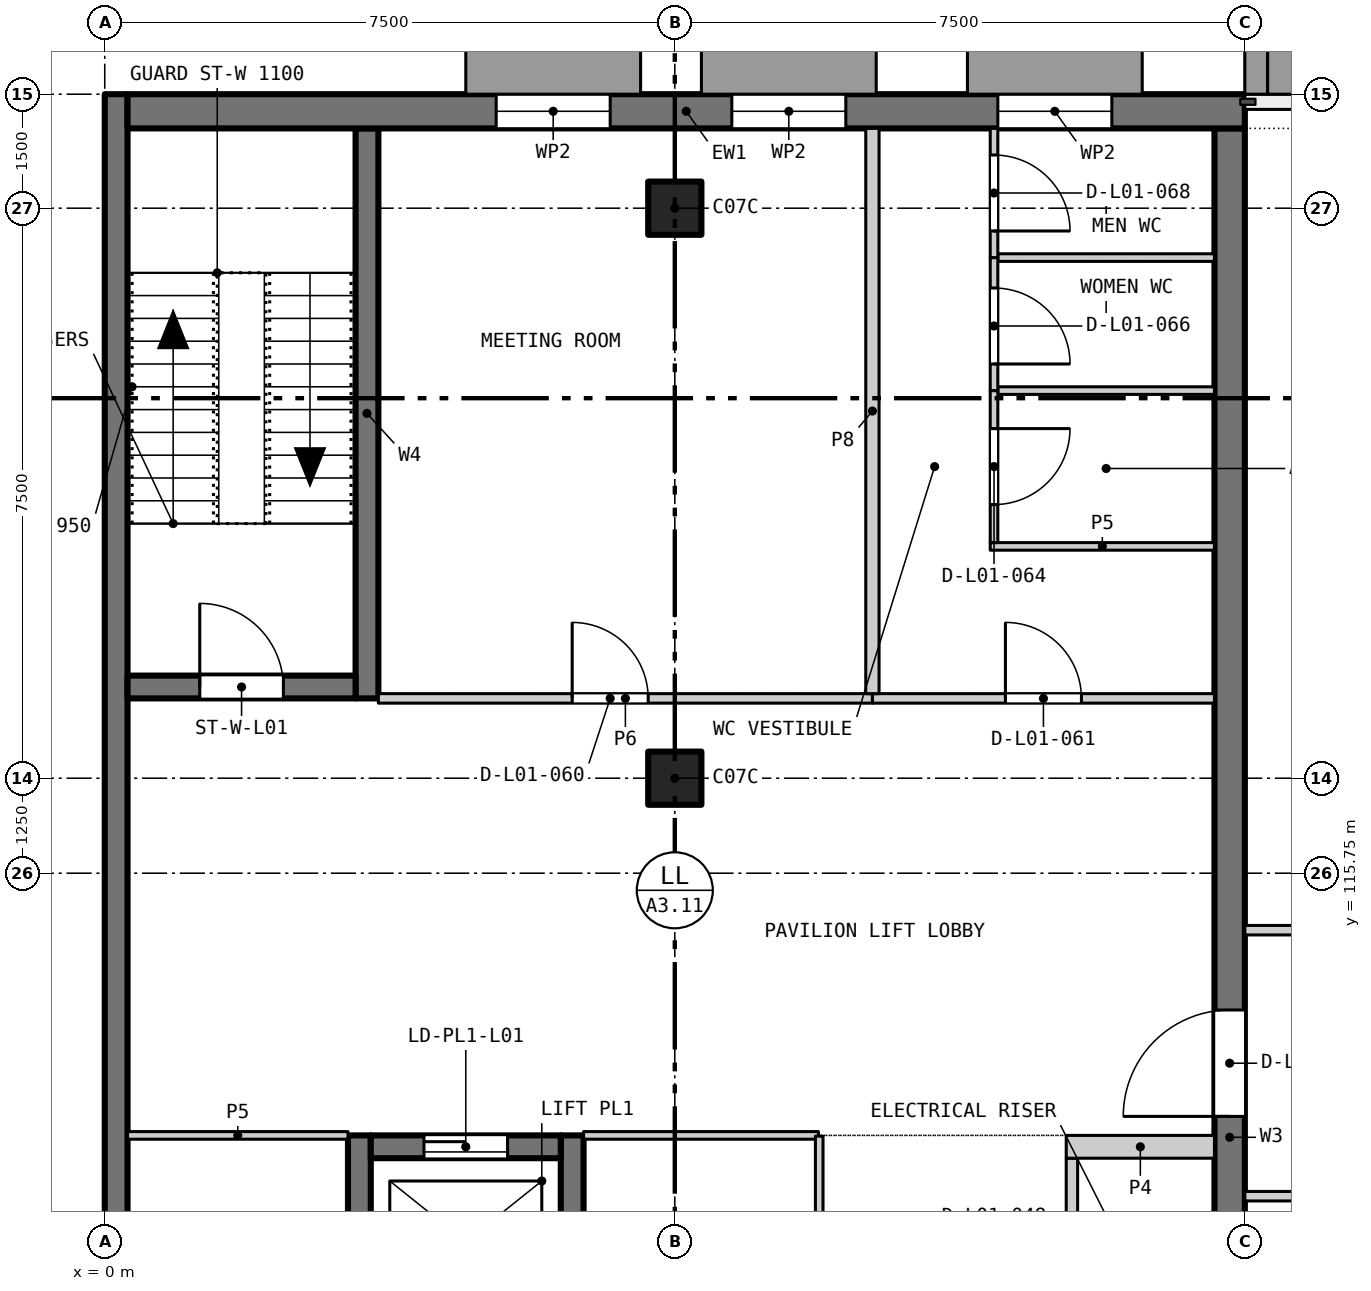
"""IFC4 building model, lengths in metres.
Left out: names, types, materials, properties, quantities, classifications, styles, units other than length and angle.
Written with IfcOpenShell. Run it as: python <this file> out.ifc"""

import sys

from ifc_helpers import new_model, si_unit, direction, frame, frame_2d, origin, origin_2d, place, context, subcontext, project, spatial, rectangle, extrude, element, fill, save


model = new_model("IFC4")
c1 = context("Model", 3, precision=1e-05, world=origin(), true_north=direction((0.0, 1.0)))
c2 = subcontext(c1, "Body", "Model", "MODEL_VIEW")
j1 = project(units=[si_unit("LENGTHUNIT", "METRE"), si_unit("PLANEANGLEUNIT", "RADIAN")], contexts=[c1])
p1 = place(None, origin())
s1 = spatial("IfcSite", under=j1, at=p1, CompositionType="ELEMENT")
p2 = place(p1, origin())
s2 = spatial("IfcBuilding", under=s1, at=p2, CompositionType="ELEMENT")
p3 = place(p2, frame((0.0, 0.0, 6.0)))
s3 = spatial("IfcBuildingStorey", under=s2, at=p3, CompositionType="ELEMENT", Elevation=6.0)
for number, where, z_axis, x_axis in (
    (1, (7.5, 117.0, 0.0), (0.0, 0.0, 1.0), (1.0, 0.0, 0.0)),
    (2, (7.5, 124.5, 0.0), (0.0, 0.0, 1.0), (1.0, 0.0, 0.0)),
):
    element("IfcColumn", number, at=place(p3, frame(where, z_axis=z_axis, x_axis=x_axis)), inside=s3, PredefinedType="COLUMN", context=c2, shape_type="SweptSolid", body=[
        extrude(rectangle(XDim=0.7, YDim=0.7, at=origin_2d()), origin(), (0.0, 0.0, 1.0), 3.9),
    ])
p4 = place(p3, frame((0.15, 18.0, 0.0), z_axis=(0.0, 0.0, 1.0), x_axis=(0.0, 1.0, 0.0)))
e3 = element("IfcWall", 3, at=p4, inside=s3, PredefinedType="SHEAR", context=c2, shape_type="SweptSolid", body=[
    extrude(rectangle(XDim=108.0, YDim=0.3, at=frame_2d((54.0, 0.0))), origin(), (0.0, 0.0, 1.0), 4.2),
])
p5 = place(p3, frame((14.8, 99.0, 0.0), z_axis=(0.0, 0.0, 1.0), x_axis=(0.0, 1.0, 0.0)))
e4 = element("IfcWall", 4, at=p5, inside=s3, PredefinedType="SHEAR", context=c2, shape_type="SweptSolid", body=[
    extrude(rectangle(XDim=26.55, YDim=0.4, at=frame_2d((13.275, 0.0))), origin(), (0.0, 0.0, 1.0), 4.2),
])
p6 = place(p5, frame((13.55, 0.0, 0.0)))
e5 = element("IfcOpeningElement", 5, at=p6, cuts=e4, PredefinedType="OPENING", context=c2, shape_type="SweptSolid", body=[
    extrude(rectangle(XDim=1.4, YDim=2.4, at=frame_2d((0.7, 1.2))), frame((0.0, 0.21, 0.0), z_axis=(0.0, -1.0, 0.0), x_axis=(1.0, 0.0, 0.0)), (0.0, 0.0, 1.0), 0.42),
])
p7 = place(p3, frame((3.45, 118.05, 0.0), z_axis=(0.0, 0.0, 1.0), x_axis=(0.0, 1.0, 0.0)))
e6 = element("IfcWall", 6, at=p7, inside=s3, PredefinedType="SHEAR", context=c2, shape_type="SweptSolid", body=[
    extrude(rectangle(XDim=7.5, YDim=0.3, at=frame_2d((3.75, 0.0))), origin(), (0.0, 0.0, 1.0), 4.2),
])
p8 = place(p3, frame((0.3, 118.2, 0.0), z_axis=(0.0, 0.0, 1.0), x_axis=(1.0, 0.0, 0.0)))
e7 = element("IfcWall", 7, at=p8, inside=s3, PredefinedType="SHEAR", context=c2, shape_type="SweptSolid", body=[
    extrude(rectangle(XDim=3.0, YDim=0.3, at=frame_2d((1.5, 0.0))), origin(), (0.0, 0.0, 1.0), 4.2),
])
p9 = place(p8, frame((0.95, 0.0, 0.0)))
e8 = element("IfcOpeningElement", 8, at=p9, cuts=e7, PredefinedType="OPENING", context=c2, shape_type="SweptSolid", body=[
    extrude(rectangle(XDim=1.1, YDim=2.1, at=frame_2d((0.55, 1.05))), frame((0.0, 0.16, 0.0), z_axis=(0.0, -1.0, 0.0), x_axis=(1.0, 0.0, 0.0)), (0.0, 0.0, 1.0), 0.32),
])
for number, where, z_axis, x_axis in (
    (9, (3.35, 109.5, 0.0), (0.0, 0.0, 1.0), (0.0, 1.0, 0.0)),
    (10, (6.15, 109.5, 0.0), (0.0, 0.0, 1.0), (0.0, 1.0, 0.0)),
):
    element("IfcWall", number, at=place(p3, frame(where, z_axis=z_axis, x_axis=x_axis)), inside=s3, PredefinedType="SHEAR", context=c2, shape_type="SweptSolid", body=[
        extrude(rectangle(XDim=2.8, YDim=0.3, at=frame_2d((1.4, 0.0))), origin(), (0.0, 0.0, 1.0), 4.2),
    ])
p10 = place(p3, frame((3.5, 112.15, 0.0), z_axis=(0.0, 0.0, 1.0), x_axis=(1.0, 0.0, 0.0)))
e11 = element("IfcWall", 11, at=p10, inside=s3, PredefinedType="SHEAR", context=c2, shape_type="SweptSolid", body=[
    extrude(rectangle(XDim=2.5, YDim=0.3, at=frame_2d((1.25, 0.0))), origin(), (0.0, 0.0, 1.0), 4.2),
])
p11 = place(p10, frame((0.7, 0.0, 0.0)))
e12 = element("IfcOpeningElement", 12, at=p11, cuts=e11, PredefinedType="OPENING", context=c2, shape_type="SweptSolid", body=[
    extrude(rectangle(XDim=1.1, YDim=2.1, at=frame_2d((0.55, 1.05))), frame((0.0, 0.16, 0.0), z_axis=(0.0, -1.0, 0.0), x_axis=(1.0, 0.0, 0.0)), (0.0, 0.0, 1.0), 0.32),
])
p12 = place(p3, frame((0.3, 125.775, 0.0), z_axis=(0.0, 0.0, 1.0), x_axis=(1.0, 0.0, 0.0)))
e13 = element("IfcWall", 13, at=p12, inside=s3, PredefinedType="SOLIDWALL", context=c2, shape_type="SweptSolid", body=[
    extrude(rectangle(XDim=14.7, YDim=0.45, at=frame_2d((7.35, 0.0))), origin(), (0.0, 0.0, 1.0), 3.9),
])
p13 = place(p12, frame((4.85, 0.0, 0.8)))
e14 = element("IfcOpeningElement", 14, at=p13, cuts=e13, PredefinedType="OPENING", context=c2, shape_type="SweptSolid", body=[
    extrude(rectangle(XDim=1.5, YDim=2.2, at=frame_2d((0.75, 1.1))), frame((0.0, 0.235, 0.0), z_axis=(0.0, -1.0, 0.0), x_axis=(1.0, 0.0, 0.0)), (0.0, 0.0, 1.0), 0.47),
])
p14 = place(p12, frame((7.95, 0.0, 0.8)))
e15 = element("IfcOpeningElement", 15, at=p14, cuts=e13, PredefinedType="OPENING", context=c2, shape_type="SweptSolid", body=[
    extrude(rectangle(XDim=1.5, YDim=2.2, at=frame_2d((0.75, 1.1))), frame((0.0, 0.235, 0.0), z_axis=(0.0, -1.0, 0.0), x_axis=(1.0, 0.0, 0.0)), (0.0, 0.0, 1.0), 0.47),
])
p15 = place(p12, frame((11.45, 0.0, 0.8)))
e16 = element("IfcOpeningElement", 16, at=p15, cuts=e13, PredefinedType="OPENING", context=c2, shape_type="SweptSolid", body=[
    extrude(rectangle(XDim=1.5, YDim=2.2, at=frame_2d((0.75, 1.1))), frame((0.0, 0.235, 0.0), z_axis=(0.0, -1.0, 0.0), x_axis=(1.0, 0.0, 0.0)), (0.0, 0.0, 1.0), 0.47),
])
p16 = place(p3, frame((12.725, 108.4, 0.0), z_axis=(0.0, 0.0, 1.0), x_axis=(0.0, 1.0, 0.0)))
e17 = element("IfcWall", 17, at=p16, inside=s3, PredefinedType="PARTITIONING", context=c2, shape_type="SweptSolid", body=[
    extrude(rectangle(XDim=3.6, YDim=0.15, at=frame_2d((1.8, 0.0))), origin(), (0.0, 0.0, 1.0), 3.9),
])
p17 = place(p16, frame((1.35, 0.0, 0.0)))
e18 = element("IfcOpeningElement", 18, at=p17, cuts=e17, PredefinedType="OPENING", context=c2, shape_type="SweptSolid", body=[
    extrude(rectangle(XDim=0.9, YDim=2.1, at=frame_2d((0.45, 1.05))), frame((0.0, 0.085, 0.0), z_axis=(0.0, -1.0, 0.0), x_axis=(1.0, 0.0, 0.0)), (0.0, 0.0, 1.0), 0.17),
])
p18 = place(p3, frame((12.65, 112.15, 0.0), z_axis=(0.0, 0.0, 1.0), x_axis=(1.0, 0.0, 0.0)))
e19 = element("IfcWall", 19, at=p18, inside=s3, PredefinedType="PARTITIONING", context=c2, shape_type="SweptSolid", body=[
    extrude(rectangle(XDim=1.95, YDim=0.3, at=frame_2d((0.975, 0.0))), origin(), (0.0, 0.0, 1.0), 3.9),
])
p19 = place(p3, frame((15.0, 111.5, 0.0), z_axis=(0.0, 0.0, 1.0), x_axis=(1.0, 0.0, 0.0)))
e20 = element("IfcWall", 20, at=p19, inside=s3, PredefinedType="PARTITIONING", context=c2, shape_type="SweptSolid", body=[
    extrude(rectangle(XDim=14.0, YDim=0.125, at=frame_2d((7.0, 0.0))), origin(), (0.0, 0.0, 1.0), 3.9),
])
p20 = place(p19, frame((1.2, 0.0, 0.0)))
e21 = element("IfcOpeningElement", 21, at=p20, cuts=e20, PredefinedType="OPENING", context=c2, shape_type="SweptSolid", body=[
    extrude(rectangle(XDim=1.8, YDim=2.1, at=frame_2d((0.9, 1.05))), frame((0.0, 0.073, 0.0), z_axis=(0.0, -1.0, 0.0), x_axis=(1.0, 0.0, 0.0)), (0.0, 0.0, 1.0), 0.145),
])
p21 = place(p19, frame((11.0, 0.0, 0.0)))
e22 = element("IfcOpeningElement", 22, at=p21, cuts=e20, PredefinedType="OPENING", context=c2, shape_type="SweptSolid", body=[
    extrude(rectangle(XDim=1.8, YDim=2.1, at=frame_2d((0.9, 1.05))), frame((0.0, 0.073, 0.0), z_axis=(0.0, -1.0, 0.0), x_axis=(1.0, 0.0, 0.0)), (0.0, 0.0, 1.0), 0.145),
])
p22 = place(p3, frame((0.3, 112.3, 0.0), z_axis=(0.0, 0.0, 1.0), x_axis=(1.0, 0.0, 0.0)))
e23 = element("IfcWall", 23, at=p22, inside=s3, PredefinedType="PARTITIONING", context=c2, shape_type="SweptSolid", body=[
    extrude(rectangle(XDim=2.9, YDim=0.1, at=frame_2d((1.45, 0.0))), origin(), (0.0, 0.0, 1.0), 3.9),
])
p23 = place(p3, frame((6.3, 112.3, 0.0), z_axis=(0.0, 0.0, 1.0), x_axis=(1.0, 0.0, 0.0)))
e24 = element("IfcWall", 24, at=p23, inside=s3, PredefinedType="PARTITIONING", context=c2, shape_type="SweptSolid", body=[
    extrude(rectangle(XDim=3.09, YDim=0.1, at=frame_2d((1.545, 0.0))), origin(), (0.0, 0.0, 1.0), 3.9),
])
p24 = place(p3, frame((15.0, 115.0, 0.0), z_axis=(0.0, 0.0, 1.0), x_axis=(1.0, 0.0, 0.0)))
e25 = element("IfcWall", 25, at=p24, inside=s3, PredefinedType="PARTITIONING", context=c2, shape_type="SweptSolid", body=[
    extrude(rectangle(XDim=14.0, YDim=0.125, at=frame_2d((7.0, 0.0))), origin(), (0.0, 0.0, 1.0), 3.9),
])
p25 = place(p24, frame((1.2, 0.0, 0.0)))
e26 = element("IfcOpeningElement", 26, at=p25, cuts=e25, PredefinedType="OPENING", context=c2, shape_type="SweptSolid", body=[
    extrude(rectangle(XDim=1.8, YDim=2.1, at=frame_2d((0.9, 1.05))), frame((0.0, 0.073, 0.0), z_axis=(0.0, -1.0, 0.0), x_axis=(1.0, 0.0, 0.0)), (0.0, 0.0, 1.0), 0.145),
])
p26 = place(p24, frame((11.0, 0.0, 0.0)))
e27 = element("IfcOpeningElement", 27, at=p26, cuts=e25, PredefinedType="OPENING", context=c2, shape_type="SweptSolid", body=[
    extrude(rectangle(XDim=1.8, YDim=2.1, at=frame_2d((0.9, 1.05))), frame((0.0, 0.073, 0.0), z_axis=(0.0, -1.0, 0.0), x_axis=(1.0, 0.0, 0.0)), (0.0, 0.0, 1.0), 0.145),
])
p27 = place(p3, frame((3.6, 118.05, 0.0), z_axis=(0.0, 0.0, 1.0), x_axis=(1.0, 0.0, 0.0)))
e28 = element("IfcWall", 28, at=p27, inside=s3, PredefinedType="PARTITIONING", context=c2, shape_type="SweptSolid", body=[
    extrude(rectangle(XDim=6.5, YDim=0.125, at=frame_2d((3.25, 0.0))), origin(), (0.0, 0.0, 1.0), 3.9),
])
p28 = place(p27, frame((2.55, 0.0, 0.0)))
e29 = element("IfcOpeningElement", 29, at=p28, cuts=e28, PredefinedType="OPENING", context=c2, shape_type="SweptSolid", body=[
    extrude(rectangle(XDim=1.0, YDim=2.1, at=frame_2d((0.5, 1.05))), frame((0.0, 0.073, 0.0), z_axis=(0.0, -1.0, 0.0), x_axis=(1.0, 0.0, 0.0)), (0.0, 0.0, 1.0), 0.145),
])
p29 = place(p3, frame((10.1, 118.05, 0.0), z_axis=(0.0, 0.0, 1.0), x_axis=(1.0, 0.0, 0.0)))
e30 = element("IfcWall", 30, at=p29, inside=s3, PredefinedType="PARTITIONING", context=c2, shape_type="SweptSolid", body=[
    extrude(rectangle(XDim=4.5, YDim=0.125, at=frame_2d((2.25, 0.0))), origin(), (0.0, 0.0, 1.0), 3.9),
])
p30 = place(p29, frame((1.75, 0.0, 0.0)))
e31 = element("IfcOpeningElement", 31, at=p30, cuts=e30, PredefinedType="OPENING", context=c2, shape_type="SweptSolid", body=[
    extrude(rectangle(XDim=1.0, YDim=2.1, at=frame_2d((0.5, 1.05))), frame((0.0, 0.073, 0.0), z_axis=(0.0, -1.0, 0.0), x_axis=(1.0, 0.0, 0.0)), (0.0, 0.0, 1.0), 0.145),
])
p31 = place(p3, frame((11.65, 120.05, 0.0), z_axis=(0.0, 0.0, 1.0), x_axis=(1.0, 0.0, 0.0)))
e32 = element("IfcWall", 32, at=p31, inside=s3, PredefinedType="PARTITIONING", context=c2, shape_type="SweptSolid", body=[
    extrude(rectangle(XDim=2.95, YDim=0.1, at=frame_2d((1.475, 0.0))), origin(), (0.0, 0.0, 1.0), 3.9),
])
for number, where, z_axis, x_axis in (
    (33, (11.75, 122.1, 0.0), (0.0, 0.0, 1.0), (1.0, 0.0, 0.0)),
    (34, (11.75, 123.85, 0.0), (0.0, 0.0, 1.0), (1.0, 0.0, 0.0)),
):
    element("IfcWall", number, at=place(p3, frame(where, z_axis=z_axis, x_axis=x_axis)), inside=s3, PredefinedType="PARTITIONING", context=c2, shape_type="SweptSolid", body=[
        extrude(rectangle(XDim=2.85, YDim=0.1, at=frame_2d((1.425, 0.0))), origin(), (0.0, 0.0, 1.0), 3.9),
    ])
p32 = place(p3, frame((9.4, 108.962, 0.0), z_axis=(0.0, 0.0, 1.0), x_axis=(0.0, 1.0, 0.0)))
e35 = element("IfcWall", 35, at=p32, inside=s3, PredefinedType="PARTITIONING", context=c2, shape_type="SweptSolid", body=[
    extrude(rectangle(XDim=3.328, YDim=0.1, at=frame_2d((1.664, 0.0))), origin(), (0.0, 0.0, 1.0), 3.9),
])
p33 = place(p3, frame((10.1, 118.113, 0.0), z_axis=(0.0, 0.0, 1.0), x_axis=(0.0, 1.0, 0.0)))
e36 = element("IfcWall", 36, at=p33, inside=s3, PredefinedType="PARTITIONING", context=c2, shape_type="SweptSolid", body=[
    extrude(rectangle(XDim=7.438, YDim=0.175, at=frame_2d((3.719, 0.0))), origin(), (0.0, 0.0, 1.0), 3.9),
])
p34 = place(p3, frame((11.7, 120.1, 0.0), z_axis=(0.0, 0.0, 1.0), x_axis=(0.0, 1.0, 0.0)))
e37 = element("IfcWall", 37, at=p34, inside=s3, PredefinedType="PARTITIONING", context=c2, shape_type="SweptSolid", body=[
    extrude(rectangle(XDim=2.0, YDim=0.1, at=frame_2d((1.0, 0.0))), origin(), (0.0, 0.0, 1.0), 3.9),
])
p35 = place(p34, frame((0.5, 0.0, 0.0)))
e38 = element("IfcOpeningElement", 38, at=p35, cuts=e37, PredefinedType="OPENING", context=c2, shape_type="SweptSolid", body=[
    extrude(rectangle(XDim=1.0, YDim=2.1, at=frame_2d((0.5, 1.05))), frame((0.0, 0.06, 0.0), z_axis=(0.0, -1.0, 0.0), x_axis=(1.0, 0.0, 0.0)), (0.0, 0.0, 1.0), 0.12),
])
p36 = place(p3, frame((11.7, 122.1, 0.0), z_axis=(0.0, 0.0, 1.0), x_axis=(0.0, 1.0, 0.0)))
e39 = element("IfcWall", 39, at=p36, inside=s3, PredefinedType="PARTITIONING", context=c2, shape_type="SweptSolid", body=[
    extrude(rectangle(XDim=1.75, YDim=0.1, at=frame_2d((0.875, 0.0))), origin(), (0.0, 0.0, 1.0), 3.9),
])
p37 = place(p36, frame((0.35, 0.0, 0.0)))
e40 = element("IfcOpeningElement", 40, at=p37, cuts=e39, PredefinedType="OPENING", context=c2, shape_type="SweptSolid", body=[
    extrude(rectangle(XDim=1.0, YDim=2.1, at=frame_2d((0.5, 1.05))), frame((0.0, 0.06, 0.0), z_axis=(0.0, -1.0, 0.0), x_axis=(1.0, 0.0, 0.0)), (0.0, 0.0, 1.0), 0.12),
])
p38 = place(p3, frame((11.7, 123.85, 0.0), z_axis=(0.0, 0.0, 1.0), x_axis=(0.0, 1.0, 0.0)))
e41 = element("IfcWall", 41, at=p38, inside=s3, PredefinedType="PARTITIONING", context=c2, shape_type="SweptSolid", body=[
    extrude(rectangle(XDim=1.7, YDim=0.1, at=frame_2d((0.85, 0.0))), origin(), (0.0, 0.0, 1.0), 3.9),
])
p39 = place(p38, frame((0.35, 0.0, 0.0)))
e42 = element("IfcOpeningElement", 42, at=p39, cuts=e41, PredefinedType="OPENING", context=c2, shape_type="SweptSolid", body=[
    extrude(rectangle(XDim=1.0, YDim=2.1, at=frame_2d((0.5, 1.05))), frame((0.0, 0.06, 0.0), z_axis=(0.0, -1.0, 0.0), x_axis=(1.0, 0.0, 0.0)), (0.0, 0.0, 1.0), 0.12),
])
p40 = place(p13, origin())
e43 = element("IfcWindow", 43, at=p40, inside=s3, PartitioningType="SINGLE_PANEL", PredefinedType="WINDOW", context=c2, shape_type="SweptSolid", body=[
    extrude(rectangle(XDim=1.5, YDim=2.2, at=frame_2d((0.75, 1.1))), frame((0.0, -0.075, 0.0), z_axis=(0.0, -1.0, 0.0), x_axis=(1.0, 0.0, 0.0)), (0.0, 0.0, 1.0), 0.06),
])
fill(e14, e43)
p41 = place(p14, origin())
e44 = element("IfcWindow", 44, at=p41, inside=s3, PartitioningType="SINGLE_PANEL", PredefinedType="WINDOW", context=c2, shape_type="SweptSolid", body=[
    extrude(rectangle(XDim=1.5, YDim=2.2, at=frame_2d((0.75, 1.1))), frame((0.0, -0.075, 0.0), z_axis=(0.0, -1.0, 0.0), x_axis=(1.0, 0.0, 0.0)), (0.0, 0.0, 1.0), 0.06),
])
fill(e15, e44)
p42 = place(p15, origin())
e45 = element("IfcWindow", 45, at=p42, inside=s3, PartitioningType="SINGLE_PANEL", PredefinedType="WINDOW", context=c2, shape_type="SweptSolid", body=[
    extrude(rectangle(XDim=1.5, YDim=2.2, at=frame_2d((0.75, 1.1))), frame((0.0, -0.075, 0.0), z_axis=(0.0, -1.0, 0.0), x_axis=(1.0, 0.0, 0.0)), (0.0, 0.0, 1.0), 0.06),
])
fill(e16, e45)
p43 = place(p6, origin())
e46 = element("IfcDoor", 46, at=p43, inside=s3, OperationType="SINGLE_SWING_LEFT", PredefinedType="DOOR", context=c2, shape_type="SweptSolid", body=[
    extrude(rectangle(XDim=1.4, YDim=2.4, at=frame_2d((0.7, 1.2))), frame((0.0, 0.025, 0.0), z_axis=(0.0, -1.0, 0.0), x_axis=(1.0, 0.0, 0.0)), (0.0, 0.0, 1.0), 0.05),
])
fill(e5, e46)
p44 = place(p28, origin())
e47 = element("IfcDoor", 47, at=p44, inside=s3, OperationType="SINGLE_SWING_LEFT", PredefinedType="DOOR", context=c2, shape_type="SweptSolid", body=[
    extrude(rectangle(XDim=1.0, YDim=2.1, at=frame_2d((0.5, 1.05))), frame((0.0, 0.025, 0.0), z_axis=(0.0, -1.0, 0.0), x_axis=(1.0, 0.0, 0.0)), (0.0, 0.0, 1.0), 0.05),
])
fill(e29, e47)
p45 = place(p30, origin())
e48 = element("IfcDoor", 48, at=p45, inside=s3, OperationType="SINGLE_SWING_LEFT", PredefinedType="DOOR", context=c2, shape_type="SweptSolid", body=[
    extrude(rectangle(XDim=1.0, YDim=2.1, at=frame_2d((0.5, 1.05))), frame((0.0, 0.025, 0.0), z_axis=(0.0, -1.0, 0.0), x_axis=(1.0, 0.0, 0.0)), (0.0, 0.0, 1.0), 0.05),
])
fill(e31, e48)
p46 = place(p35, frame((1.0, 0.0, 0.0), z_axis=(0.0, 0.0, 1.0), x_axis=(-1.0, 0.0, 0.0)))
e49 = element("IfcDoor", 49, at=p46, inside=s3, OperationType="SINGLE_SWING_LEFT", PredefinedType="DOOR", context=c2, shape_type="SweptSolid", body=[
    extrude(rectangle(XDim=1.0, YDim=2.1, at=frame_2d((0.5, 1.05))), frame((0.0, 0.025, 0.0), z_axis=(0.0, -1.0, 0.0), x_axis=(1.0, 0.0, 0.0)), (0.0, 0.0, 1.0), 0.05),
])
fill(e38, e49)
p47 = place(p37, frame((1.0, 0.0, 0.0), z_axis=(0.0, 0.0, 1.0), x_axis=(-1.0, 0.0, 0.0)))
e50 = element("IfcDoor", 50, at=p47, inside=s3, OperationType="SINGLE_SWING_RIGHT", PredefinedType="DOOR", context=c2, shape_type="SweptSolid", body=[
    extrude(rectangle(XDim=1.0, YDim=2.1, at=frame_2d((0.5, 1.05))), frame((0.0, 0.025, 0.0), z_axis=(0.0, -1.0, 0.0), x_axis=(1.0, 0.0, 0.0)), (0.0, 0.0, 1.0), 0.05),
])
fill(e40, e50)
p48 = place(p39, frame((1.0, 0.0, 0.0), z_axis=(0.0, 0.0, 1.0), x_axis=(-1.0, 0.0, 0.0)))
e51 = element("IfcDoor", 51, at=p48, inside=s3, OperationType="SINGLE_SWING_RIGHT", PredefinedType="DOOR", context=c2, shape_type="SweptSolid", body=[
    extrude(rectangle(XDim=1.0, YDim=2.1, at=frame_2d((0.5, 1.05))), frame((0.0, 0.025, 0.0), z_axis=(0.0, -1.0, 0.0), x_axis=(1.0, 0.0, 0.0)), (0.0, 0.0, 1.0), 0.05),
])
fill(e42, e51)
p49 = place(p9, origin())
e52 = element("IfcDoor", 52, at=p49, inside=s3, OperationType="SINGLE_SWING_LEFT", PredefinedType="DOOR", context=c2, shape_type="SweptSolid", body=[
    extrude(rectangle(XDim=1.1, YDim=2.1, at=frame_2d((0.55, 1.05))), frame((0.0, 0.025, 0.0), z_axis=(0.0, -1.0, 0.0), x_axis=(1.0, 0.0, 0.0)), (0.0, 0.0, 1.0), 0.05),
])
fill(e8, e52)
p50 = place(p11, origin())
e53 = element("IfcDoor", 53, at=p50, inside=s3, OperationType="SLIDING_TO_LEFT", PredefinedType="DOOR", context=c2, shape_type="SweptSolid", body=[
    extrude(rectangle(XDim=1.1, YDim=2.1, at=frame_2d((0.55, 1.05))), frame((0.0, 0.025, 0.0), z_axis=(0.0, -1.0, 0.0), x_axis=(1.0, 0.0, 0.0)), (0.0, 0.0, 1.0), 0.05),
])
fill(e12, e53)
save(model, sys.argv[1])
